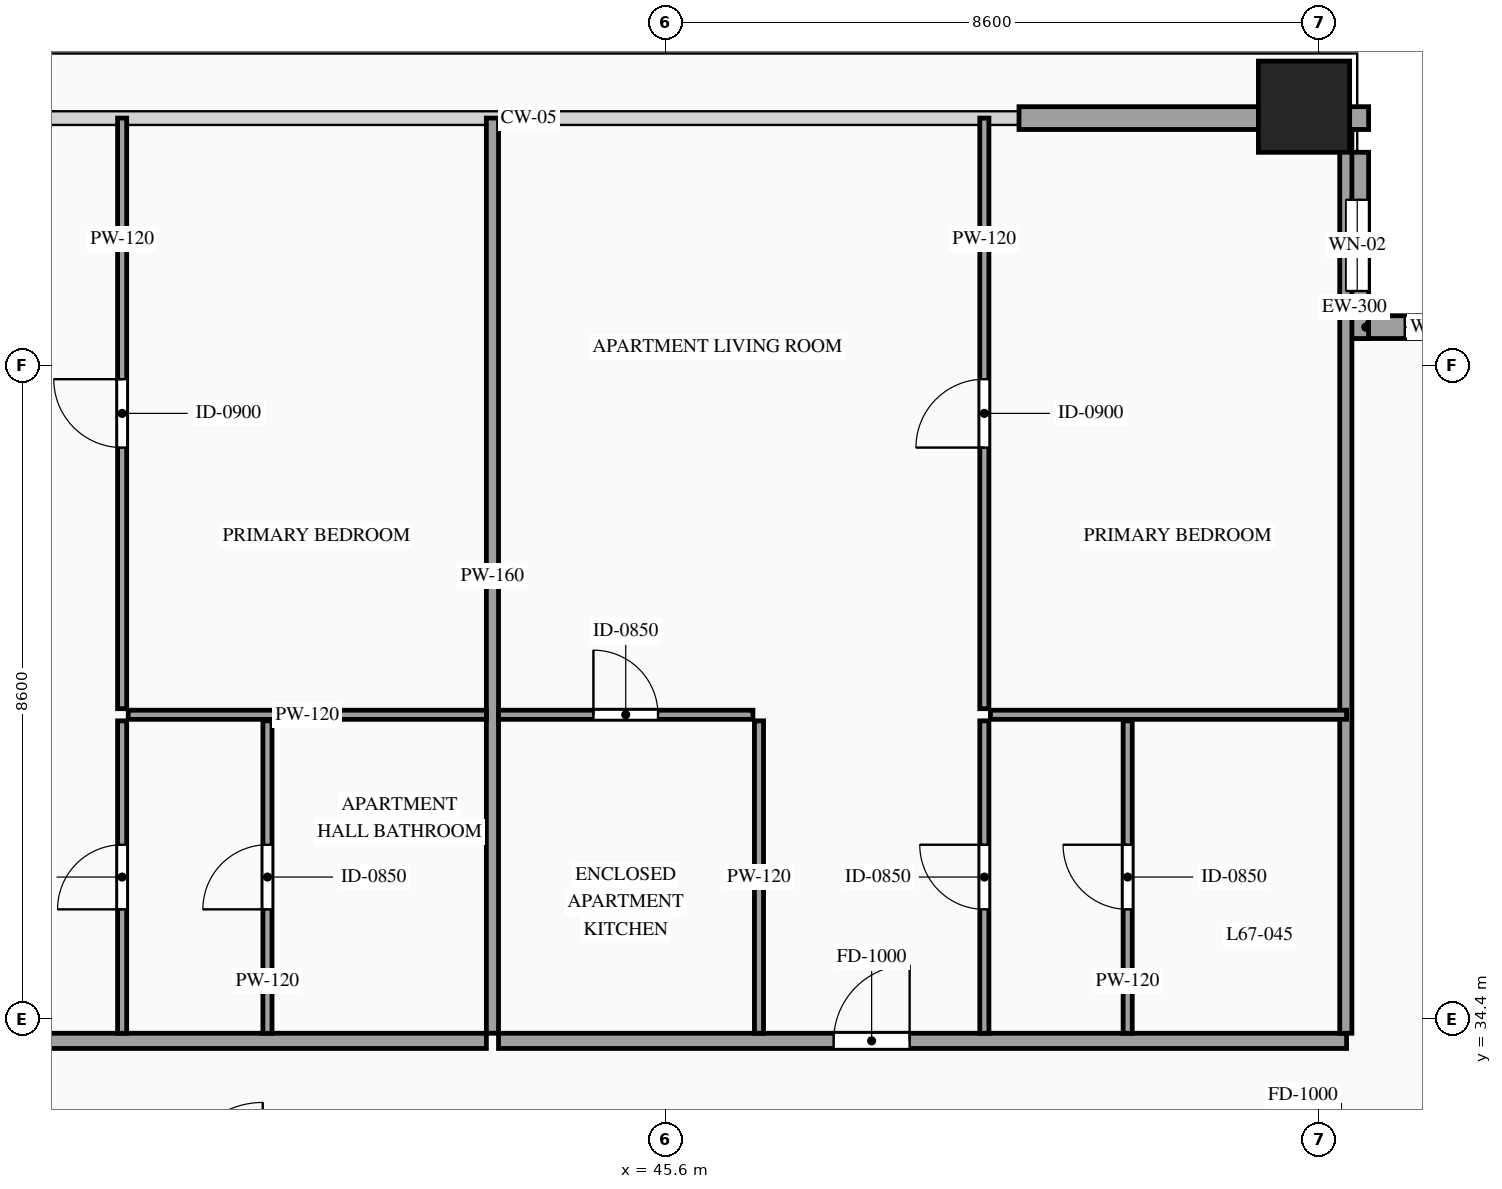
"""IFC4 building model, lengths in metres.
Left out: names, types, materials, properties, quantities, classifications, styles, units other than length and angle.
Written with IfcOpenShell. Run it as: python <this file> out.ifc"""

import sys

from ifc_helpers import new_model, si_unit, direction, frame, frame_2d, origin, origin_2d, place, context, subcontext, project, spatial, rectangle, hollow_rectangle, extrude, source, transform, mapped, element, fill, save


model = new_model("IFC4")
c1 = context("Model", 3, precision=1e-05, world=origin(), true_north=direction((0.0, 1.0)))
c2 = subcontext(c1, "Body", "Model", "MODEL_VIEW")
j1 = project(units=[si_unit("LENGTHUNIT", "METRE"), si_unit("PLANEANGLEUNIT", "RADIAN")], contexts=[c1])
p1 = place(None, origin())
s1 = spatial("IfcSite", under=j1, at=p1, CompositionType="ELEMENT")
p2 = place(p1, origin())
s2 = spatial("IfcBuilding", under=s1, at=p2, CompositionType="ELEMENT")
p3 = place(p2, frame((0.0, 0.0, 252.1)))
s3 = spatial("IfcBuildingStorey", under=s2, at=p3, CompositionType="ELEMENT", Elevation=252.1)
m1 = source(origin(), c2, "Body", "SweptSolid", [
    extrude(hollow_rectangle(XDim=1.2, YDim=1.2, WallThickness=0.055, at=origin_2d()), origin(), (0.0, 0.0, 1.0), 3.5),
])
p4 = place(p3, frame((54.0, 46.4, 0.0), z_axis=(0.0, 0.0, 1.0), x_axis=(1.0, 0.0, 0.0)))
e1 = element("IfcColumn", 1, at=p4, inside=s3, PredefinedType="COLUMN", context=c2, shape_type="MappedRepresentation", body=[
    mapped(m1, transform((0.0, 0.0, 0.0), scale=1.0)),
])
p5 = place(p3, frame((57.0, 43.5, 0.0), z_axis=(0.0, 0.0, 1.0), x_axis=(-1.0, 0.0, 0.0)))
e2 = element("IfcWall", 2, at=p5, inside=s3, PredefinedType="SOLIDWALL", context=c2, shape_type="SweptSolid", body=[
    extrude(rectangle(XDim=2.45, YDim=0.3, at=frame_2d((1.225, 0.0))), origin(), (0.0, 0.0, 1.0), 3.28),
])
p6 = place(p5, frame((0.775, 0.0, 0.85)))
e3 = element("IfcOpeningElement", 3, at=p6, cuts=e2, PredefinedType="OPENING", context=c2, shape_type="SweptSolid", body=[
    extrude(rectangle(XDim=0.9, YDim=1.5, at=frame_2d((0.45, 0.75))), frame((0.0, 0.165, 0.0), z_axis=(0.0, -1.0, 0.0), x_axis=(1.0, 0.0, 0.0)), (0.0, 0.0, 1.0), 0.33),
])
p7 = place(p3, frame((54.7, 43.35, 0.0), z_axis=(0.0, 0.0, 1.0), x_axis=(0.0, 1.0, 0.0)))
e4 = element("IfcWall", 4, at=p7, inside=s3, PredefinedType="SOLIDWALL", context=c2, shape_type="SweptSolid", body=[
    extrude(rectangle(XDim=2.45, YDim=0.3, at=frame_2d((1.225, 0.0))), origin(), (0.0, 0.0, 1.0), 3.28),
])
p8 = place(p7, frame((0.625, 0.0, 0.85)))
e5 = element("IfcOpeningElement", 5, at=p8, cuts=e4, PredefinedType="OPENING", context=c2, shape_type="SweptSolid", body=[
    extrude(rectangle(XDim=1.2, YDim=2.1, at=frame_2d((0.6, 1.05))), frame((0.0, 0.165, 0.0), z_axis=(0.0, -1.0, 0.0), x_axis=(1.0, 0.0, 0.0)), (0.0, 0.0, 1.0), 0.33),
])
m2 = source(origin(), c2, "Body", "SweptSolid", [
    extrude(rectangle(XDim=0.25, YDim=0.3, at=frame_2d((0.125, 0.0))), origin(), (0.0, 0.0, 1.0), 3.28),
])
p9 = place(p3, frame((54.6, 46.25, 0.0), z_axis=(0.0, 0.0, 1.0), x_axis=(1.0, 0.0, 0.0)))
e6 = element("IfcWall", 6, at=p9, inside=s3, PredefinedType="SOLIDWALL", context=c2, shape_type="MappedRepresentation", body=[
    mapped(m2, transform((0.0, 0.0, 0.0), scale=1.0)),
])
m3 = source(origin(), c2, "Body", "SweptSolid", [
    extrude(rectangle(XDim=3.15, YDim=0.3, at=frame_2d((1.575, 0.0))), origin(), (0.0, 0.0, 1.0), 2.835),
])
p10 = place(p3, frame((50.25, 46.25, 0.0), z_axis=(0.0, 0.0, 1.0), x_axis=(1.0, 0.0, 0.0)))
e7 = element("IfcWall", 7, at=p10, inside=s3, PredefinedType="SOLIDWALL", context=c2, shape_type="MappedRepresentation", body=[
    mapped(m3, transform((0.0, 0.0, 0.0), scale=1.0)),
])
p11 = place(p3, frame((31.461, 34.11, 0.0), z_axis=(0.0, 0.0, 1.0), x_axis=(1.0, 0.0, 0.0)))
e8 = element("IfcWall", 8, at=p11, inside=s3, PredefinedType="PARTITIONING", context=c2, shape_type="SweptSolid", body=[
    extrude(rectangle(XDim=11.781, YDim=0.2, at=frame_2d((5.891, 0.0))), origin(), (0.0, 0.0, 1.0), 3.28),
])
p12 = place(p11, frame((4.801, 0.0, 0.0)))
e9 = element("IfcOpeningElement", 9, at=p12, cuts=e8, PredefinedType="OPENING", context=c2, shape_type="SweptSolid", body=[
    extrude(rectangle(XDim=1.0, YDim=2.2, at=frame_2d((0.5, 1.1))), frame((0.0, 0.115, 0.0), z_axis=(0.0, -1.0, 0.0), x_axis=(1.0, 0.0, 0.0)), (0.0, 0.0, 1.0), 0.23),
])
m4 = source(origin(), c2, "Body", "SweptSolid", [
    extrude(rectangle(XDim=12.04, YDim=0.16, at=frame_2d((6.02, 0.0))), origin(), (0.0, 0.0, 1.0), 3.28),
])
p13 = place(p3, frame((43.322, 34.21, 0.0), z_axis=(0.0, 0.0, 1.0), x_axis=(0.0, 1.0, 0.0)))
e10 = element("IfcWall", 10, at=p13, inside=s3, PredefinedType="PARTITIONING", context=c2, shape_type="MappedRepresentation", body=[
    mapped(m4, transform((0.0, 0.0, 0.0), scale=1.0)),
])
p14 = place(p3, frame((40.362, 34.21, 0.0), z_axis=(0.0, 0.0, 1.0), x_axis=(0.0, 1.0, 0.0)))
e11 = element("IfcWall", 11, at=p14, inside=s3, PredefinedType="PARTITIONING", context=c2, shape_type="SweptSolid", body=[
    extrude(rectangle(XDim=4.11, YDim=0.12, at=frame_2d((2.055, 0.0))), origin(), (0.0, 0.0, 1.0), 3.28),
])
p15 = place(p14, frame((1.63, 0.0, 0.0)))
e12 = element("IfcOpeningElement", 12, at=p15, cuts=e11, PredefinedType="OPENING", context=c2, shape_type="SweptSolid", body=[
    extrude(rectangle(XDim=0.85, YDim=2.1, at=frame_2d((0.425, 1.05))), frame((0.0, 0.075, 0.0), z_axis=(0.0, -1.0, 0.0), x_axis=(1.0, 0.0, 0.0)), (0.0, 0.0, 1.0), 0.15),
])
m5 = source(origin(), c2, "Body", "SweptSolid", [
    extrude(rectangle(XDim=4.712, YDim=0.12, at=frame_2d((2.356, 0.0))), origin(), (0.0, 0.0, 1.0), 3.28),
])
p16 = place(p3, frame((38.53, 38.4, 0.0), z_axis=(0.0, 0.0, 1.0), x_axis=(1.0, 0.0, 0.0)))
e13 = element("IfcWall", 13, at=p16, inside=s3, PredefinedType="PARTITIONING", context=c2, shape_type="MappedRepresentation", body=[
    mapped(m5, transform((0.0, 0.0, 0.0), scale=1.0)),
])
p17 = place(p3, frame((38.45, 38.48, 0.0), z_axis=(0.0, 0.0, 1.0), x_axis=(0.0, 1.0, 0.0)))
e14 = element("IfcWall", 14, at=p17, inside=s3, PredefinedType="PARTITIONING", context=c2, shape_type="SweptSolid", body=[
    extrude(rectangle(XDim=7.77, YDim=0.12, at=frame_2d((3.885, 0.0))), origin(), (0.0, 0.0, 1.0), 3.28),
])
p18 = place(p17, frame((3.435, 0.0, 0.0)))
e15 = element("IfcOpeningElement", 15, at=p18, cuts=e14, PredefinedType="OPENING", context=c2, shape_type="SweptSolid", body=[
    extrude(rectangle(XDim=0.9, YDim=2.15, at=frame_2d((0.45, 1.075))), frame((0.0, 0.075, 0.0), z_axis=(0.0, -1.0, 0.0), x_axis=(1.0, 0.0, 0.0)), (0.0, 0.0, 1.0), 0.15),
])
p19 = place(p3, frame((38.45, 34.21, 0.0), z_axis=(0.0, 0.0, 1.0), x_axis=(0.0, 1.0, 0.0)))
e16 = element("IfcWall", 16, at=p19, inside=s3, PredefinedType="PARTITIONING", context=c2, shape_type="SweptSolid", body=[
    extrude(rectangle(XDim=4.11, YDim=0.12, at=frame_2d((2.055, 0.0))), origin(), (0.0, 0.0, 1.0), 3.28),
])
p20 = place(p19, frame((1.63, 0.0, 0.0)))
e17 = element("IfcOpeningElement", 17, at=p20, cuts=e16, PredefinedType="OPENING", context=c2, shape_type="SweptSolid", body=[
    extrude(rectangle(XDim=0.85, YDim=2.1, at=frame_2d((0.425, 1.05))), frame((0.0, 0.075, 0.0), z_axis=(0.0, -1.0, 0.0), x_axis=(1.0, 0.0, 0.0)), (0.0, 0.0, 1.0), 0.15),
])
p21 = place(p3, frame((43.402, 34.11, 0.0), z_axis=(0.0, 0.0, 1.0), x_axis=(1.0, 0.0, 0.0)))
e18 = element("IfcWall", 18, at=p21, inside=s3, PredefinedType="PARTITIONING", context=c2, shape_type="SweptSolid", body=[
    extrude(rectangle(XDim=11.158, YDim=0.2, at=frame_2d((5.579, 0.0))), origin(), (0.0, 0.0, 1.0), 3.28),
])
p22 = place(p21, frame((4.409, 0.0, 0.0)))
e19 = element("IfcOpeningElement", 19, at=p22, cuts=e18, PredefinedType="OPENING", context=c2, shape_type="SweptSolid", body=[
    extrude(rectangle(XDim=1.0, YDim=2.2, at=frame_2d((0.5, 1.1))), frame((0.0, 0.115, 0.0), z_axis=(0.0, -1.0, 0.0), x_axis=(1.0, 0.0, 0.0)), (0.0, 0.0, 1.0), 0.23),
])
m6 = source(origin(), c2, "Body", "SweptSolid", [
    extrude(rectangle(XDim=11.89, YDim=0.16, at=frame_2d((5.945, 0.0))), origin(), (0.0, 0.0, 1.0), 3.28),
])
p23 = place(p3, frame((54.55, 34.21, 0.0), z_axis=(0.0, 0.0, 1.0), x_axis=(0.0, 1.0, 0.0)))
e20 = element("IfcWall", 20, at=p23, inside=s3, PredefinedType="PARTITIONING", context=c2, shape_type="MappedRepresentation", body=[
    mapped(m6, transform((0.0, 0.0, 0.0), scale=1.0)),
])
p24 = place(p3, frame((43.402, 38.4, 0.0), z_axis=(0.0, 0.0, 1.0), x_axis=(1.0, 0.0, 0.0)))
e21 = element("IfcWall", 21, at=p24, inside=s3, PredefinedType="PARTITIONING", context=c2, shape_type="SweptSolid", body=[
    extrude(rectangle(XDim=3.347, YDim=0.12, at=frame_2d((1.673, 0.0))), origin(), (0.0, 0.0, 1.0), 3.28),
])
p25 = place(p24, frame((1.249, 0.0, 0.0)))
e22 = element("IfcOpeningElement", 22, at=p25, cuts=e21, PredefinedType="OPENING", context=c2, shape_type="SweptSolid", body=[
    extrude(rectangle(XDim=0.85, YDim=2.1, at=frame_2d((0.425, 1.05))), frame((0.0, 0.075, 0.0), z_axis=(0.0, -1.0, 0.0), x_axis=(1.0, 0.0, 0.0)), (0.0, 0.0, 1.0), 0.15),
])
m7 = source(origin(), c2, "Body", "SweptSolid", [
    extrude(rectangle(XDim=4.11, YDim=0.12, at=frame_2d((2.055, 0.0))), origin(), (0.0, 0.0, 1.0), 3.28),
])
p26 = place(p3, frame((46.829, 34.21, 0.0), z_axis=(0.0, 0.0, 1.0), x_axis=(0.0, 1.0, 0.0)))
e23 = element("IfcWall", 23, at=p26, inside=s3, PredefinedType="PARTITIONING", context=c2, shape_type="MappedRepresentation", body=[
    mapped(m7, transform((0.0, 0.0, 0.0), scale=1.0)),
])
p27 = place(p3, frame((51.68, 34.21, 0.0), z_axis=(0.0, 0.0, 1.0), x_axis=(0.0, 1.0, 0.0)))
e24 = element("IfcWall", 24, at=p27, inside=s3, PredefinedType="PARTITIONING", context=c2, shape_type="SweptSolid", body=[
    extrude(rectangle(XDim=4.11, YDim=0.12, at=frame_2d((2.055, 0.0))), origin(), (0.0, 0.0, 1.0), 3.28),
])
p28 = place(p27, frame((1.63, 0.0, 0.0)))
e25 = element("IfcOpeningElement", 25, at=p28, cuts=e24, PredefinedType="OPENING", context=c2, shape_type="SweptSolid", body=[
    extrude(rectangle(XDim=0.85, YDim=2.1, at=frame_2d((0.425, 1.05))), frame((0.0, 0.075, 0.0), z_axis=(0.0, -1.0, 0.0), x_axis=(1.0, 0.0, 0.0)), (0.0, 0.0, 1.0), 0.15),
])
m8 = source(origin(), c2, "Body", "SweptSolid", [
    extrude(rectangle(XDim=4.686, YDim=0.12, at=frame_2d((2.343, 0.0))), origin(), (0.0, 0.0, 1.0), 3.28),
])
p29 = place(p3, frame((49.874, 38.4, 0.0), z_axis=(0.0, 0.0, 1.0), x_axis=(1.0, 0.0, 0.0)))
e26 = element("IfcWall", 26, at=p29, inside=s3, PredefinedType="PARTITIONING", context=c2, shape_type="MappedRepresentation", body=[
    mapped(m8, transform((0.0, 0.0, 0.0), scale=1.0)),
])
p30 = place(p3, frame((49.794, 38.48, 0.0), z_axis=(0.0, 0.0, 1.0), x_axis=(0.0, 1.0, 0.0)))
e27 = element("IfcWall", 27, at=p30, inside=s3, PredefinedType="PARTITIONING", context=c2, shape_type="SweptSolid", body=[
    extrude(rectangle(XDim=7.77, YDim=0.12, at=frame_2d((3.885, 0.0))), origin(), (0.0, 0.0, 1.0), 3.28),
])
p31 = place(p30, frame((3.435, 0.0, 0.0)))
e28 = element("IfcOpeningElement", 28, at=p31, cuts=e27, PredefinedType="OPENING", context=c2, shape_type="SweptSolid", body=[
    extrude(rectangle(XDim=0.9, YDim=2.15, at=frame_2d((0.45, 1.075))), frame((0.0, 0.075, 0.0), z_axis=(0.0, -1.0, 0.0), x_axis=(1.0, 0.0, 0.0)), (0.0, 0.0, 1.0), 0.15),
])
p32 = place(p3, frame((49.794, 34.21, 0.0), z_axis=(0.0, 0.0, 1.0), x_axis=(0.0, 1.0, 0.0)))
e29 = element("IfcWall", 29, at=p32, inside=s3, PredefinedType="PARTITIONING", context=c2, shape_type="SweptSolid", body=[
    extrude(rectangle(XDim=4.11, YDim=0.12, at=frame_2d((2.055, 0.0))), origin(), (0.0, 0.0, 1.0), 3.28),
])
p33 = place(p32, frame((1.63, 0.0, 0.0)))
e30 = element("IfcOpeningElement", 30, at=p33, cuts=e29, PredefinedType="OPENING", context=c2, shape_type="SweptSolid", body=[
    extrude(rectangle(XDim=0.85, YDim=2.1, at=frame_2d((0.425, 1.05))), frame((0.0, 0.075, 0.0), z_axis=(0.0, -1.0, 0.0), x_axis=(1.0, 0.0, 0.0)), (0.0, 0.0, 1.0), 0.15),
])
m9 = source(origin(), c2, "Body", "SweptSolid", [
    extrude(rectangle(XDim=0.9, YDim=1.5, at=frame_2d((0.45, 0.75))), frame((0.0, 0.03, 0.0), z_axis=(0.0, -1.0, 0.0), x_axis=(1.0, 0.0, 0.0)), (0.0, 0.0, 1.0), 0.06),
])
p34 = place(p6, origin())
e31 = element("IfcWindow", 31, at=p34, inside=s3, PartitioningType="SINGLE_PANEL", PredefinedType="WINDOW", context=c2, shape_type="MappedRepresentation", body=[
    mapped(m9, transform((0.0, 0.0, 0.0), scale=1.0)),
])
fill(e3, e31)
m10 = source(origin(), c2, "Body", "SweptSolid", [
    extrude(rectangle(XDim=1.2, YDim=2.1, at=frame_2d((0.6, 1.05))), frame((0.0, 0.03, 0.0), z_axis=(0.0, -1.0, 0.0), x_axis=(1.0, 0.0, 0.0)), (0.0, 0.0, 1.0), 0.06),
])
p35 = place(p8, origin())
e32 = element("IfcWindow", 32, at=p35, inside=s3, PartitioningType="SINGLE_PANEL", PredefinedType="WINDOW", context=c2, shape_type="MappedRepresentation", body=[
    mapped(m10, transform((0.0, 0.0, 0.0), scale=1.0)),
])
fill(e5, e32)
m11 = source(origin(), c2, "Body", "SweptSolid", [
    extrude(rectangle(XDim=0.85, YDim=2.1, at=frame_2d((0.425, 1.05))), frame((0.0, 0.025, 0.0), z_axis=(0.0, -1.0, 0.0), x_axis=(1.0, 0.0, 0.0)), (0.0, 0.0, 1.0), 0.05),
])
p36 = place(p15, origin())
e33 = element("IfcDoor", 33, at=p36, inside=s3, OperationType="SINGLE_SWING_LEFT", PredefinedType="DOOR", context=c2, shape_type="MappedRepresentation", body=[
    mapped(m11, transform((0.0, 0.0, 0.0), scale=1.0)),
])
fill(e12, e33)
m12 = source(origin(), c2, "Body", "SweptSolid", [
    extrude(rectangle(XDim=0.9, YDim=2.15, at=frame_2d((0.45, 1.075))), frame((0.0, 0.025, 0.0), z_axis=(0.0, -1.0, 0.0), x_axis=(1.0, 0.0, 0.0)), (0.0, 0.0, 1.0), 0.05),
])
p37 = place(p18, origin())
e34 = element("IfcDoor", 34, at=p37, inside=s3, OperationType="SINGLE_SWING_RIGHT", PredefinedType="DOOR", context=c2, shape_type="MappedRepresentation", body=[
    mapped(m12, transform((0.0, 0.0, 0.0), scale=1.0)),
])
fill(e15, e34)
p38 = place(p20, origin())
e35 = element("IfcDoor", 35, at=p38, inside=s3, OperationType="SINGLE_SWING_LEFT", PredefinedType="DOOR", context=c2, shape_type="MappedRepresentation", body=[
    mapped(m11, transform((0.0, 0.0, 0.0), scale=1.0)),
])
fill(e17, e35)
m13 = source(origin(), c2, "Body", "SweptSolid", [
    extrude(rectangle(XDim=1.0, YDim=2.2, at=frame_2d((0.5, 1.1))), frame((0.0, 0.025, 0.0), z_axis=(0.0, -1.0, 0.0), x_axis=(1.0, 0.0, 0.0)), (0.0, 0.0, 1.0), 0.05),
])
p39 = place(p22, origin())
e36 = element("IfcDoor", 36, at=p39, inside=s3, OperationType="SINGLE_SWING_RIGHT", PredefinedType="DOOR", context=c2, shape_type="MappedRepresentation", body=[
    mapped(m13, transform((0.0, 0.0, 0.0), scale=1.0)),
])
fill(e19, e36)
p40 = place(p25, origin())
e37 = element("IfcDoor", 37, at=p40, inside=s3, OperationType="SINGLE_SWING_LEFT", PredefinedType="DOOR", context=c2, shape_type="MappedRepresentation", body=[
    mapped(m11, transform((0.0, 0.0, 0.0), scale=1.0)),
])
fill(e22, e37)
p41 = place(p28, origin())
e38 = element("IfcDoor", 38, at=p41, inside=s3, OperationType="SINGLE_SWING_RIGHT", PredefinedType="DOOR", context=c2, shape_type="MappedRepresentation", body=[
    mapped(m11, transform((0.0, 0.0, 0.0), scale=1.0)),
])
fill(e25, e38)
p42 = place(p31, origin())
e39 = element("IfcDoor", 39, at=p42, inside=s3, OperationType="SINGLE_SWING_LEFT", PredefinedType="DOOR", context=c2, shape_type="MappedRepresentation", body=[
    mapped(m12, transform((0.0, 0.0, 0.0), scale=1.0)),
])
fill(e28, e39)
p43 = place(p33, origin())
e40 = element("IfcDoor", 40, at=p43, inside=s3, OperationType="SINGLE_SWING_RIGHT", PredefinedType="DOOR", context=c2, shape_type="MappedRepresentation", body=[
    mapped(m11, transform((0.0, 0.0, 0.0), scale=1.0)),
])
fill(e30, e40)
save(model, sys.argv[1])
